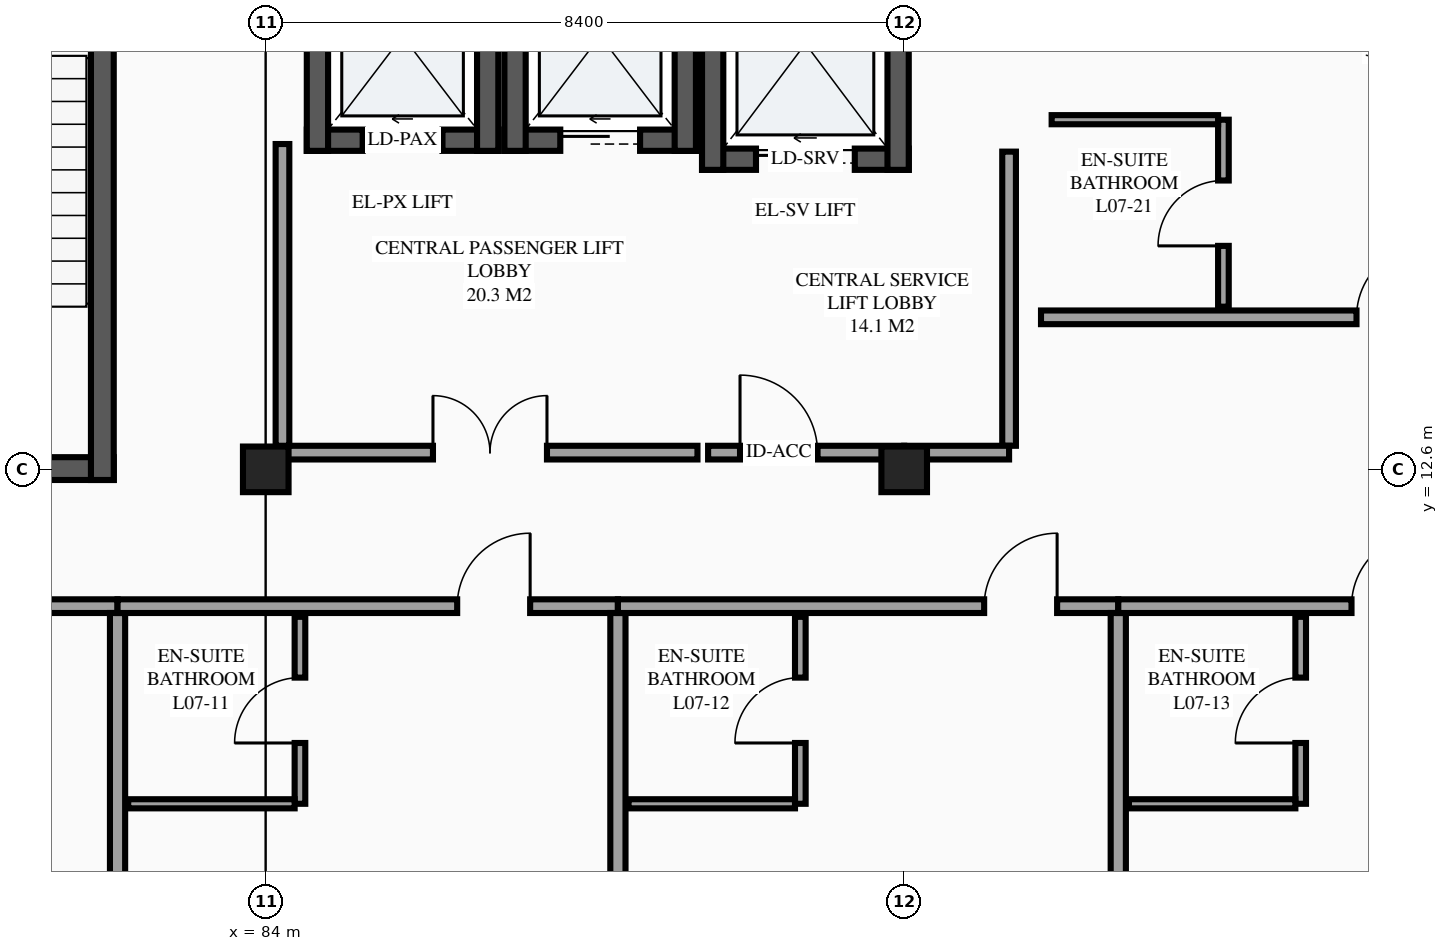
"""IFC4 building model, lengths in metres.
Left out: names, types, materials, properties, quantities, classifications, styles, units other than length and angle.
Written with IfcOpenShell. Run it as: python <this file> out.ifc"""

import sys

from ifc_helpers import new_model, si_unit, direction, frame, frame_2d, origin, origin_2d, place, context, subcontext, project, spatial, rectangle, extrude, element, fill, save


model = new_model("IFC4")
c1 = context("Model", 3, precision=1e-05, world=origin(), true_north=direction((0.0, 1.0)))
c2 = subcontext(c1, "Body", "Model", "MODEL_VIEW")
j1 = project(units=[si_unit("LENGTHUNIT", "METRE"), si_unit("PLANEANGLEUNIT", "RADIAN")], contexts=[c1])
p1 = place(None, origin())
s1 = spatial("IfcSite", under=j1, at=p1, CompositionType="ELEMENT")
p2 = place(p1, origin())
s2 = spatial("IfcBuilding", under=s1, at=p2, CompositionType="ELEMENT")
p3 = place(p2, frame((0.0, 0.0, 29.1)))
s3 = spatial("IfcBuildingStorey", under=s2, at=p3, CompositionType="ELEMENT", Elevation=29.1)
for number, where, z_axis, x_axis in (
    (1, (84.0, 12.6, 0.0), (0.0, 0.0, 1.0), (1.0, 0.0, 0.0)),
    (2, (92.4, 12.6, 0.0), (0.0, 0.0, 1.0), (1.0, 0.0, 0.0)),
):
    element("IfcColumn", number, at=place(p3, frame(where, z_axis=z_axis, x_axis=x_axis)), inside=s3, PredefinedType="COLUMN", context=c2, shape_type="SweptSolid", body=[
        extrude(rectangle(XDim=0.6, YDim=0.6, at=origin_2d()), origin(), (0.0, 0.0, 1.0), 3.6),
    ])
p4 = place(p3, frame((84.54, 16.93, 0.0), z_axis=(0.0, 0.0, 1.0), x_axis=(1.0, 0.0, 0.0)))
e3 = element("IfcWall", 3, at=p4, inside=s3, PredefinedType="SHEAR", context=c2, shape_type="SweptSolid", body=[
    extrude(rectangle(XDim=2.52, YDim=0.28, at=frame_2d((1.26, 0.0))), origin(), (0.0, 0.0, 1.0), 3.6),
])
p5 = place(p4, frame((0.735, 0.0, 0.0)))
e4 = element("IfcOpeningElement", 4, at=p5, cuts=e3, PredefinedType="OPENING", context=c2, shape_type="SweptSolid", body=[
    extrude(rectangle(XDim=1.05, YDim=2.2, at=frame_2d((0.525, 1.1))), frame((0.0, 0.15, 0.0), z_axis=(0.0, -1.0, 0.0), x_axis=(1.0, 0.0, 0.0)), (0.0, 0.0, 1.0), 0.3),
])
for number, where, z_axis, x_axis in (
    (5, (86.92, 16.79, 0.0), (0.0, 0.0, 1.0), (0.0, 1.0, 0.0)),
    (6, (84.68, 19.81, 0.0), (0.0, 0.0, 1.0), (0.0, -1.0, 0.0)),
):
    element("IfcWall", number, at=place(p3, frame(where, z_axis=z_axis, x_axis=x_axis)), inside=s3, PredefinedType="SHEAR", context=c2, shape_type="SweptSolid", body=[
        extrude(rectangle(XDim=3.02, YDim=0.28, at=frame_2d((1.51, 0.0))), origin(), (0.0, 0.0, 1.0), 3.6),
    ])
p6 = place(p3, frame((87.14, 16.93, 0.0), z_axis=(0.0, 0.0, 1.0), x_axis=(1.0, 0.0, 0.0)))
e7 = element("IfcWall", 7, at=p6, inside=s3, PredefinedType="SHEAR", context=c2, shape_type="SweptSolid", body=[
    extrude(rectangle(XDim=2.52, YDim=0.28, at=frame_2d((1.26, 0.0))), origin(), (0.0, 0.0, 1.0), 3.6),
])
p7 = place(p6, frame((0.735, 0.0, 0.0)))
e8 = element("IfcOpeningElement", 8, at=p7, cuts=e7, PredefinedType="OPENING", context=c2, shape_type="SweptSolid", body=[
    extrude(rectangle(XDim=1.05, YDim=2.2, at=frame_2d((0.525, 1.1))), frame((0.0, 0.15, 0.0), z_axis=(0.0, -1.0, 0.0), x_axis=(1.0, 0.0, 0.0)), (0.0, 0.0, 1.0), 0.3),
])
for number, where, z_axis, x_axis in (
    (9, (89.52, 16.79, 0.0), (0.0, 0.0, 1.0), (0.0, 1.0, 0.0)),
    (10, (87.28, 19.81, 0.0), (0.0, 0.0, 1.0), (0.0, -1.0, 0.0)),
):
    element("IfcWall", number, at=place(p3, frame(where, z_axis=z_axis, x_axis=x_axis)), inside=s3, PredefinedType="SHEAR", context=c2, shape_type="SweptSolid", body=[
        extrude(rectangle(XDim=3.02, YDim=0.28, at=frame_2d((1.51, 0.0))), origin(), (0.0, 0.0, 1.0), 3.6),
    ])
p8 = place(p3, frame((89.74, 16.68, 0.0), z_axis=(0.0, 0.0, 1.0), x_axis=(1.0, 0.0, 0.0)))
e11 = element("IfcWall", 11, at=p8, inside=s3, PredefinedType="SHEAR", context=c2, shape_type="SweptSolid", body=[
    extrude(rectangle(XDim=2.72, YDim=0.28, at=frame_2d((1.36, 0.0))), origin(), (0.0, 0.0, 1.0), 3.6),
])
p9 = place(p8, frame((0.71, 0.0, 0.0)))
e12 = element("IfcOpeningElement", 12, at=p9, cuts=e11, PredefinedType="OPENING", context=c2, shape_type="SweptSolid", body=[
    extrude(rectangle(XDim=1.3, YDim=2.25, at=frame_2d((0.65, 1.125))), frame((0.0, 0.15, 0.0), z_axis=(0.0, -1.0, 0.0), x_axis=(1.0, 0.0, 0.0)), (0.0, 0.0, 1.0), 0.3),
])
for number, where, z_axis, x_axis in (
    (13, (92.32, 16.54, 0.0), (0.0, 0.0, 1.0), (0.0, 1.0, 0.0)),
    (14, (89.88, 19.86, 0.0), (0.0, 0.0, 1.0), (0.0, -1.0, 0.0)),
):
    element("IfcWall", number, at=place(p3, frame(where, z_axis=z_axis, x_axis=x_axis)), inside=s3, PredefinedType="SHEAR", context=c2, shape_type="SweptSolid", body=[
        extrude(rectangle(XDim=3.32, YDim=0.28, at=frame_2d((1.66, 0.0))), origin(), (0.0, 0.0, 1.0), 3.6),
    ])
p10 = place(p3, frame((76.8, 12.61, 0.0), z_axis=(0.0, 0.0, 1.0), x_axis=(1.0, 0.0, 0.0)))
e15 = element("IfcWall", 15, at=p10, inside=s3, PredefinedType="SHEAR", context=c2, shape_type="SweptSolid", body=[
    extrude(rectangle(XDim=5.2, YDim=0.3, at=frame_2d((2.6, 0.0))), origin(), (0.0, 0.0, 1.0), 3.6),
])
p11 = place(p10, frame((2.025, 0.0, 0.0)))
e16 = element("IfcOpeningElement", 16, at=p11, cuts=e15, PredefinedType="OPENING", context=c2, shape_type="SweptSolid", body=[
    extrude(rectangle(XDim=1.15, YDim=2.15, at=frame_2d((0.575, 1.075))), frame((0.0, 0.16, 0.0), z_axis=(0.0, -1.0, 0.0), x_axis=(1.0, 0.0, 0.0)), (0.0, 0.0, 1.0), 0.32),
])
p12 = place(p3, frame((81.85, 12.46, 0.0), z_axis=(0.0, 0.0, 1.0), x_axis=(0.0, 1.0, 0.0)))
e17 = element("IfcWall", 17, at=p12, inside=s3, PredefinedType="SHEAR", context=c2, shape_type="SweptSolid", body=[
    extrude(rectangle(XDim=8.84, YDim=0.3, at=frame_2d((4.42, 0.0))), origin(), (0.0, 0.0, 1.0), 3.6),
])
p13 = place(p3, frame((75.467, 10.8, 0.0), z_axis=(0.0, 0.0, 1.0), x_axis=(1.0, 0.0, 0.0)))
e18 = element("IfcWall", 18, at=p13, inside=s3, PredefinedType="PARTITIONING", context=c2, shape_type="SweptSolid", body=[
    extrude(rectangle(XDim=6.583, YDim=0.18, at=frame_2d((3.292, 0.0))), origin(), (0.0, 0.0, 1.0), 3.375),
])
p14 = place(p13, frame((4.469, 0.0, 0.0)))
e19 = element("IfcOpeningElement", 19, at=p14, cuts=e18, PredefinedType="OPENING", context=c2, shape_type="SweptSolid", body=[
    extrude(rectangle(XDim=0.96, YDim=2.15, at=frame_2d((0.48, 1.075))), frame((0.0, 0.1, 0.0), z_axis=(0.0, -1.0, 0.0), x_axis=(1.0, 0.0, 0.0)), (0.0, 0.0, 1.0), 0.2),
])
p15 = place(p3, frame((82.05, 4.37, 0.0), z_axis=(0.0, 0.0, 1.0), x_axis=(0.0, 1.0, 0.0)))
e20 = element("IfcWall", 20, at=p15, inside=s3, PredefinedType="PARTITIONING", context=c2, shape_type="SweptSolid", body=[
    extrude(rectangle(XDim=6.34, YDim=0.2, at=frame_2d((3.17, 0.0))), origin(), (0.0, 0.0, 1.0), 3.375),
])
p16 = place(p3, frame((82.05, 10.8, 0.0), z_axis=(0.0, 0.0, 1.0), x_axis=(1.0, 0.0, 0.0)))
e21 = element("IfcWall", 21, at=p16, inside=s3, PredefinedType="PARTITIONING", context=c2, shape_type="SweptSolid", body=[
    extrude(rectangle(XDim=6.583, YDim=0.18, at=frame_2d((3.292, 0.0))), origin(), (0.0, 0.0, 1.0), 3.375),
])
p17 = place(p16, frame((4.469, 0.0, 0.0)))
e22 = element("IfcOpeningElement", 22, at=p17, cuts=e21, PredefinedType="OPENING", context=c2, shape_type="SweptSolid", body=[
    extrude(rectangle(XDim=0.96, YDim=2.15, at=frame_2d((0.48, 1.075))), frame((0.0, 0.1, 0.0), z_axis=(0.0, -1.0, 0.0), x_axis=(1.0, 0.0, 0.0)), (0.0, 0.0, 1.0), 0.2),
])
p18 = place(p3, frame((88.633, 4.37, 0.0), z_axis=(0.0, 0.0, 1.0), x_axis=(0.0, 1.0, 0.0)))
e23 = element("IfcWall", 23, at=p18, inside=s3, PredefinedType="PARTITIONING", context=c2, shape_type="SweptSolid", body=[
    extrude(rectangle(XDim=6.34, YDim=0.2, at=frame_2d((3.17, 0.0))), origin(), (0.0, 0.0, 1.0), 3.375),
])
p19 = place(p3, frame((84.45, 8.2, 0.0), z_axis=(0.0, 0.0, 1.0), x_axis=(0.0, 1.0, 0.0)))
e24 = element("IfcWall", 24, at=p19, inside=s3, PredefinedType="PARTITIONING", context=c2, shape_type="SweptSolid", body=[
    extrude(rectangle(XDim=2.46, YDim=0.14, at=frame_2d((1.23, 0.0))), origin(), (0.0, 0.0, 1.0), 3.375),
])
p20 = place(p19, frame((0.8, 0.0, 0.0)))
e25 = element("IfcOpeningElement", 25, at=p20, cuts=e24, PredefinedType="OPENING", context=c2, shape_type="SweptSolid", body=[
    extrude(rectangle(XDim=0.86, YDim=2.1, at=frame_2d((0.43, 1.05))), frame((0.0, 0.08, 0.0), z_axis=(0.0, -1.0, 0.0), x_axis=(1.0, 0.0, 0.0)), (0.0, 0.0, 1.0), 0.16),
])
p21 = place(p3, frame((82.19, 8.2, 0.0), z_axis=(0.0, 0.0, 1.0), x_axis=(1.0, 0.0, 0.0)))
e26 = element("IfcWall", 26, at=p21, inside=s3, PredefinedType="PARTITIONING", context=c2, shape_type="SweptSolid", body=[
    extrude(rectangle(XDim=2.19, YDim=0.12, at=frame_2d((1.095, 0.0))), origin(), (0.0, 0.0, 1.0), 3.375),
])
p22 = place(p3, frame((88.633, 10.8, 0.0), z_axis=(0.0, 0.0, 1.0), x_axis=(1.0, 0.0, 0.0)))
e27 = element("IfcWall", 27, at=p22, inside=s3, PredefinedType="PARTITIONING", context=c2, shape_type="SweptSolid", body=[
    extrude(rectangle(XDim=6.583, YDim=0.18, at=frame_2d((3.292, 0.0))), origin(), (0.0, 0.0, 1.0), 3.375),
])
p23 = place(p22, frame((4.819, 0.0, 0.0)))
e28 = element("IfcOpeningElement", 28, at=p23, cuts=e27, PredefinedType="OPENING", context=c2, shape_type="SweptSolid", body=[
    extrude(rectangle(XDim=0.96, YDim=2.15, at=frame_2d((0.48, 1.075))), frame((0.0, 0.1, 0.0), z_axis=(0.0, -1.0, 0.0), x_axis=(1.0, 0.0, 0.0)), (0.0, 0.0, 1.0), 0.2),
])
p24 = place(p3, frame((95.217, 4.37, 0.0), z_axis=(0.0, 0.0, 1.0), x_axis=(0.0, 1.0, 0.0)))
e29 = element("IfcWall", 29, at=p24, inside=s3, PredefinedType="PARTITIONING", context=c2, shape_type="SweptSolid", body=[
    extrude(rectangle(XDim=6.34, YDim=0.2, at=frame_2d((3.17, 0.0))), origin(), (0.0, 0.0, 1.0), 3.375),
])
p25 = place(p3, frame((91.033, 8.2, 0.0), z_axis=(0.0, 0.0, 1.0), x_axis=(0.0, 1.0, 0.0)))
e30 = element("IfcWall", 30, at=p25, inside=s3, PredefinedType="PARTITIONING", context=c2, shape_type="SweptSolid", body=[
    extrude(rectangle(XDim=2.46, YDim=0.14, at=frame_2d((1.23, 0.0))), origin(), (0.0, 0.0, 1.0), 3.375),
])
p26 = place(p25, frame((0.8, 0.0, 0.0)))
e31 = element("IfcOpeningElement", 31, at=p26, cuts=e30, PredefinedType="OPENING", context=c2, shape_type="SweptSolid", body=[
    extrude(rectangle(XDim=0.86, YDim=2.1, at=frame_2d((0.43, 1.05))), frame((0.0, 0.08, 0.0), z_axis=(0.0, -1.0, 0.0), x_axis=(1.0, 0.0, 0.0)), (0.0, 0.0, 1.0), 0.16),
])
p27 = place(p3, frame((88.773, 8.2, 0.0), z_axis=(0.0, 0.0, 1.0), x_axis=(1.0, 0.0, 0.0)))
e32 = element("IfcWall", 32, at=p27, inside=s3, PredefinedType="PARTITIONING", context=c2, shape_type="SweptSolid", body=[
    extrude(rectangle(XDim=2.19, YDim=0.12, at=frame_2d((1.095, 0.0))), origin(), (0.0, 0.0, 1.0), 3.375),
])
p28 = place(p3, frame((95.217, 10.8, 0.0), z_axis=(0.0, 0.0, 1.0), x_axis=(1.0, 0.0, 0.0)))
e33 = element("IfcWall", 33, at=p28, inside=s3, PredefinedType="PARTITIONING", context=c2, shape_type="SweptSolid", body=[
    extrude(rectangle(XDim=6.583, YDim=0.18, at=frame_2d((3.292, 0.0))), origin(), (0.0, 0.0, 1.0), 3.375),
])
p29 = place(p28, frame((3.069, 0.0, 0.0)))
e34 = element("IfcOpeningElement", 34, at=p29, cuts=e33, PredefinedType="OPENING", context=c2, shape_type="SweptSolid", body=[
    extrude(rectangle(XDim=0.96, YDim=2.15, at=frame_2d((0.48, 1.075))), frame((0.0, 0.1, 0.0), z_axis=(0.0, -1.0, 0.0), x_axis=(1.0, 0.0, 0.0)), (0.0, 0.0, 1.0), 0.2),
])
p30 = place(p3, frame((97.617, 8.2, 0.0), z_axis=(0.0, 0.0, 1.0), x_axis=(0.0, 1.0, 0.0)))
e35 = element("IfcWall", 35, at=p30, inside=s3, PredefinedType="PARTITIONING", context=c2, shape_type="SweptSolid", body=[
    extrude(rectangle(XDim=2.46, YDim=0.14, at=frame_2d((1.23, 0.0))), origin(), (0.0, 0.0, 1.0), 3.375),
])
p31 = place(p30, frame((0.8, 0.0, 0.0)))
e36 = element("IfcOpeningElement", 36, at=p31, cuts=e35, PredefinedType="OPENING", context=c2, shape_type="SweptSolid", body=[
    extrude(rectangle(XDim=0.86, YDim=2.1, at=frame_2d((0.43, 1.05))), frame((0.0, 0.08, 0.0), z_axis=(0.0, -1.0, 0.0), x_axis=(1.0, 0.0, 0.0)), (0.0, 0.0, 1.0), 0.16),
])
p32 = place(p3, frame((95.357, 8.2, 0.0), z_axis=(0.0, 0.0, 1.0), x_axis=(1.0, 0.0, 0.0)))
e37 = element("IfcWall", 37, at=p32, inside=s3, PredefinedType="PARTITIONING", context=c2, shape_type="SweptSolid", body=[
    extrude(rectangle(XDim=2.19, YDim=0.12, at=frame_2d((1.095, 0.0))), origin(), (0.0, 0.0, 1.0), 3.375),
])
p33 = place(p3, frame((94.2, 14.6, 0.0), z_axis=(0.0, 0.0, 1.0), x_axis=(1.0, 0.0, 0.0)))
e38 = element("IfcWall", 38, at=p33, inside=s3, PredefinedType="PARTITIONING", context=c2, shape_type="SweptSolid", body=[
    extrude(rectangle(XDim=7.2, YDim=0.18, at=frame_2d((3.6, 0.0))), origin(), (0.0, 0.0, 1.0), 3.375),
])
p34 = place(p33, frame((4.151, 0.0, 0.0)))
e39 = element("IfcOpeningElement", 39, at=p34, cuts=e38, PredefinedType="OPENING", context=c2, shape_type="SweptSolid", body=[
    extrude(rectangle(XDim=0.96, YDim=2.15, at=frame_2d((0.48, 1.075))), frame((0.0, 0.1, 0.0), z_axis=(0.0, -1.0, 0.0), x_axis=(1.0, 0.0, 0.0)), (0.0, 0.0, 1.0), 0.2),
])
p35 = place(p3, frame((96.6, 14.74, 0.0), z_axis=(0.0, 0.0, 1.0), x_axis=(0.0, 1.0, 0.0)))
e40 = element("IfcWall", 40, at=p35, inside=s3, PredefinedType="PARTITIONING", context=c2, shape_type="SweptSolid", body=[
    extrude(rectangle(XDim=2.46, YDim=0.14, at=frame_2d((1.23, 0.0))), origin(), (0.0, 0.0, 1.0), 3.375),
])
p36 = place(p35, frame((0.8, 0.0, 0.0)))
e41 = element("IfcOpeningElement", 41, at=p36, cuts=e40, PredefinedType="OPENING", context=c2, shape_type="SweptSolid", body=[
    extrude(rectangle(XDim=0.86, YDim=2.1, at=frame_2d((0.43, 1.05))), frame((0.0, 0.08, 0.0), z_axis=(0.0, -1.0, 0.0), x_axis=(1.0, 0.0, 0.0)), (0.0, 0.0, 1.0), 0.16),
])
p37 = place(p3, frame((94.34, 17.2, 0.0), z_axis=(0.0, 0.0, 1.0), x_axis=(1.0, 0.0, 0.0)))
e42 = element("IfcWall", 42, at=p37, inside=s3, PredefinedType="PARTITIONING", context=c2, shape_type="SweptSolid", body=[
    extrude(rectangle(XDim=2.19, YDim=0.12, at=frame_2d((1.095, 0.0))), origin(), (0.0, 0.0, 1.0), 3.375),
])
p38 = place(p3, frame((84.22, 12.82, 0.0), z_axis=(0.0, 0.0, 1.0), x_axis=(1.0, 0.0, 0.0)))
e43 = element("IfcWall", 43, at=p38, inside=s3, PredefinedType="PARTITIONING", context=c2, shape_type="SweptSolid", body=[
    extrude(rectangle(XDim=5.46, YDim=0.18, at=frame_2d((2.73, 0.0))), origin(), (0.0, 0.0, 1.0), 2.63),
])
p39 = place(p38, frame((1.98, 0.0, 0.0)))
e44 = element("IfcOpeningElement", 44, at=p39, cuts=e43, PredefinedType="OPENING", context=c2, shape_type="SweptSolid", body=[
    extrude(rectangle(XDim=1.5, YDim=2.15, at=frame_2d((0.75, 1.075))), frame((0.0, 0.1, 0.0), z_axis=(0.0, -1.0, 0.0), x_axis=(1.0, 0.0, 0.0)), (0.0, 0.0, 1.0), 0.2),
])
p40 = place(p3, frame((84.22, 12.91, 0.0), z_axis=(0.0, 0.0, 1.0), x_axis=(0.0, 1.0, 0.0)))
e45 = element("IfcWall", 45, at=p40, inside=s3, PredefinedType="PARTITIONING", context=c2, shape_type="SweptSolid", body=[
    extrude(rectangle(XDim=3.97, YDim=0.18, at=frame_2d((1.985, 0.0))), origin(), (0.0, 0.0, 1.0), 2.48),
])
p41 = place(p3, frame((89.82, 12.82, 0.0), z_axis=(0.0, 0.0, 1.0), x_axis=(1.0, 0.0, 0.0)))
e46 = element("IfcWall", 46, at=p41, inside=s3, PredefinedType="PARTITIONING", context=c2, shape_type="SweptSolid", body=[
    extrude(rectangle(XDim=2.58, YDim=0.18, at=frame_2d((1.29, 0.0))), origin(), (0.0, 0.0, 1.0), 2.63),
])
p42 = place(p41, frame((0.42, 0.0, 0.0)))
e47 = element("IfcOpeningElement", 47, at=p42, cuts=e46, PredefinedType="OPENING", context=c2, shape_type="SweptSolid", body=[
    extrude(rectangle(XDim=1.02, YDim=2.15, at=frame_2d((0.51, 1.075))), frame((0.0, 0.1, 0.0), z_axis=(0.0, -1.0, 0.0), x_axis=(1.0, 0.0, 0.0)), (0.0, 0.0, 1.0), 0.2),
])
p43 = place(p3, frame((93.78, 12.91, 0.0), z_axis=(0.0, 0.0, 1.0), x_axis=(0.0, 1.0, 0.0)))
e48 = element("IfcWall", 48, at=p43, inside=s3, PredefinedType="PARTITIONING", context=c2, shape_type="SweptSolid", body=[
    extrude(rectangle(XDim=3.87, YDim=0.18, at=frame_2d((1.935, 0.0))), origin(), (0.0, 0.0, 1.0), 3.375),
])
p44 = place(p3, frame((92.4, 12.82, 0.0), z_axis=(0.0, 0.0, 1.0), x_axis=(1.0, 0.0, 0.0)))
e49 = element("IfcWall", 49, at=p44, inside=s3, PredefinedType="PARTITIONING", context=c2, shape_type="SweptSolid", body=[
    extrude(rectangle(XDim=1.38, YDim=0.18, at=frame_2d((0.69, 0.0))), origin(), (0.0, 0.0, 1.0), 2.73),
])
p45 = place(p5, origin())
e50 = element("IfcDoor", 50, at=p45, inside=s3, OperationType="SLIDING_TO_LEFT", PredefinedType="DOOR", context=c2, shape_type="SweptSolid", body=[
    extrude(rectangle(XDim=1.05, YDim=2.2, at=frame_2d((0.525, 1.1))), frame((0.0, 0.025, 0.0), z_axis=(0.0, -1.0, 0.0), x_axis=(1.0, 0.0, 0.0)), (0.0, 0.0, 1.0), 0.05),
])
fill(e4, e50)
p46 = place(p7, origin())
e51 = element("IfcDoor", 51, at=p46, inside=s3, OperationType="SLIDING_TO_LEFT", PredefinedType="DOOR", context=c2, shape_type="SweptSolid", body=[
    extrude(rectangle(XDim=1.05, YDim=2.2, at=frame_2d((0.525, 1.1))), frame((0.0, 0.025, 0.0), z_axis=(0.0, -1.0, 0.0), x_axis=(1.0, 0.0, 0.0)), (0.0, 0.0, 1.0), 0.05),
])
fill(e8, e51)
p47 = place(p9, origin())
e52 = element("IfcDoor", 52, at=p47, inside=s3, OperationType="SLIDING_TO_LEFT", PredefinedType="DOOR", context=c2, shape_type="SweptSolid", body=[
    extrude(rectangle(XDim=1.3, YDim=2.25, at=frame_2d((0.65, 1.125))), frame((0.0, 0.025, 0.0), z_axis=(0.0, -1.0, 0.0), x_axis=(1.0, 0.0, 0.0)), (0.0, 0.0, 1.0), 0.05),
])
fill(e12, e52)
p48 = place(p17, origin())
e53 = element("IfcDoor", 53, at=p48, inside=s3, OperationType="SINGLE_SWING_RIGHT", PredefinedType="DOOR", context=c2, shape_type="SweptSolid", body=[
    extrude(rectangle(XDim=0.96, YDim=2.15, at=frame_2d((0.48, 1.075))), frame((0.0, 0.025, 0.0), z_axis=(0.0, -1.0, 0.0), x_axis=(1.0, 0.0, 0.0)), (0.0, 0.0, 1.0), 0.05),
])
fill(e22, e53)
p49 = place(p20, origin())
e54 = element("IfcDoor", 54, at=p49, inside=s3, OperationType="SINGLE_SWING_LEFT", PredefinedType="DOOR", context=c2, shape_type="SweptSolid", body=[
    extrude(rectangle(XDim=0.86, YDim=2.1, at=frame_2d((0.43, 1.05))), frame((0.0, 0.025, 0.0), z_axis=(0.0, -1.0, 0.0), x_axis=(1.0, 0.0, 0.0)), (0.0, 0.0, 1.0), 0.05),
])
fill(e25, e54)
p50 = place(p23, origin())
e55 = element("IfcDoor", 55, at=p50, inside=s3, OperationType="SINGLE_SWING_RIGHT", PredefinedType="DOOR", context=c2, shape_type="SweptSolid", body=[
    extrude(rectangle(XDim=0.96, YDim=2.15, at=frame_2d((0.48, 1.075))), frame((0.0, 0.025, 0.0), z_axis=(0.0, -1.0, 0.0), x_axis=(1.0, 0.0, 0.0)), (0.0, 0.0, 1.0), 0.05),
])
fill(e28, e55)
p51 = place(p26, origin())
e56 = element("IfcDoor", 56, at=p51, inside=s3, OperationType="SINGLE_SWING_LEFT", PredefinedType="DOOR", context=c2, shape_type="SweptSolid", body=[
    extrude(rectangle(XDim=0.86, YDim=2.1, at=frame_2d((0.43, 1.05))), frame((0.0, 0.025, 0.0), z_axis=(0.0, -1.0, 0.0), x_axis=(1.0, 0.0, 0.0)), (0.0, 0.0, 1.0), 0.05),
])
fill(e31, e56)
p52 = place(p29, origin())
e57 = element("IfcDoor", 57, at=p52, inside=s3, OperationType="SINGLE_SWING_RIGHT", PredefinedType="DOOR", context=c2, shape_type="SweptSolid", body=[
    extrude(rectangle(XDim=0.96, YDim=2.15, at=frame_2d((0.48, 1.075))), frame((0.0, 0.025, 0.0), z_axis=(0.0, -1.0, 0.0), x_axis=(1.0, 0.0, 0.0)), (0.0, 0.0, 1.0), 0.05),
])
fill(e34, e57)
p53 = place(p31, origin())
e58 = element("IfcDoor", 58, at=p53, inside=s3, OperationType="SINGLE_SWING_LEFT", PredefinedType="DOOR", context=c2, shape_type="SweptSolid", body=[
    extrude(rectangle(XDim=0.86, YDim=2.1, at=frame_2d((0.43, 1.05))), frame((0.0, 0.025, 0.0), z_axis=(0.0, -1.0, 0.0), x_axis=(1.0, 0.0, 0.0)), (0.0, 0.0, 1.0), 0.05),
])
fill(e36, e58)
p54 = place(p34, origin())
e59 = element("IfcDoor", 59, at=p54, inside=s3, OperationType="SINGLE_SWING_RIGHT", PredefinedType="DOOR", context=c2, shape_type="SweptSolid", body=[
    extrude(rectangle(XDim=0.96, YDim=2.15, at=frame_2d((0.48, 1.075))), frame((0.0, 0.025, 0.0), z_axis=(0.0, -1.0, 0.0), x_axis=(1.0, 0.0, 0.0)), (0.0, 0.0, 1.0), 0.05),
])
fill(e39, e59)
p55 = place(p36, origin())
e60 = element("IfcDoor", 60, at=p55, inside=s3, OperationType="SINGLE_SWING_LEFT", PredefinedType="DOOR", context=c2, shape_type="SweptSolid", body=[
    extrude(rectangle(XDim=0.86, YDim=2.1, at=frame_2d((0.43, 1.05))), frame((0.0, 0.025, 0.0), z_axis=(0.0, -1.0, 0.0), x_axis=(1.0, 0.0, 0.0)), (0.0, 0.0, 1.0), 0.05),
])
fill(e41, e60)
p56 = place(p39, origin())
e61 = element("IfcDoor", 61, at=p56, inside=s3, OperationType="DOUBLE_DOOR_SINGLE_SWING", PredefinedType="DOOR", context=c2, shape_type="SweptSolid", body=[
    extrude(rectangle(XDim=1.5, YDim=2.15, at=frame_2d((0.75, 1.075))), frame((0.0, 0.025, 0.0), z_axis=(0.0, -1.0, 0.0), x_axis=(1.0, 0.0, 0.0)), (0.0, 0.0, 1.0), 0.05),
])
fill(e44, e61)
p57 = place(p42, origin())
e62 = element("IfcDoor", 62, at=p57, inside=s3, OperationType="SINGLE_SWING_LEFT", PredefinedType="DOOR", context=c2, shape_type="SweptSolid", body=[
    extrude(rectangle(XDim=1.02, YDim=2.15, at=frame_2d((0.51, 1.075))), frame((0.0, 0.025, 0.0), z_axis=(0.0, -1.0, 0.0), x_axis=(1.0, 0.0, 0.0)), (0.0, 0.0, 1.0), 0.05),
])
fill(e47, e62)
save(model, sys.argv[1])
